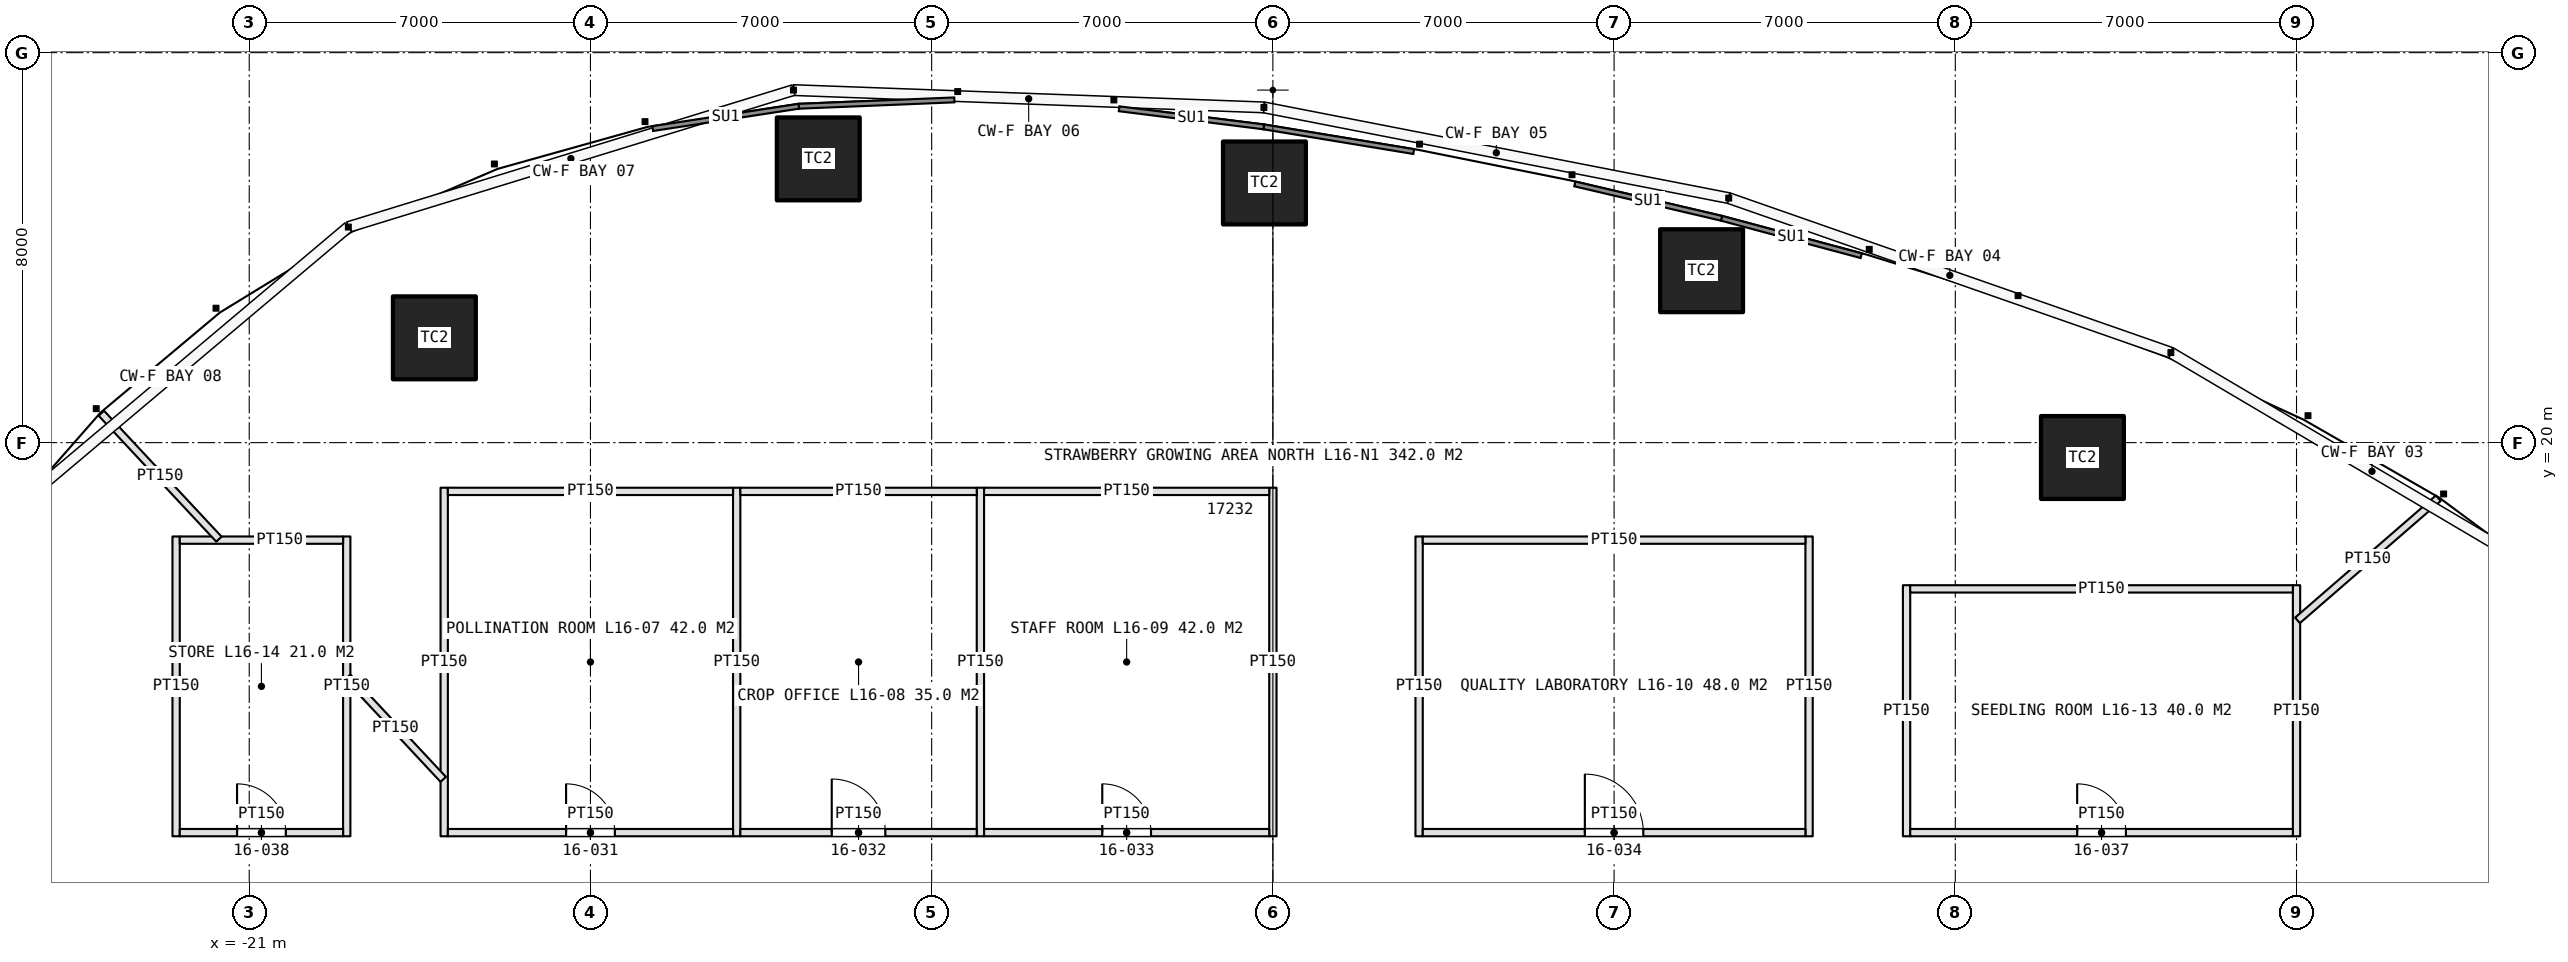
"""IFC4 building model, lengths in metres.
Left out: names, types, materials, properties, quantities, classifications, styles, units other than length and angle.
Written with IfcOpenShell. Run it as: python <this file> out.ifc"""

import sys

from ifc_helpers import new_model, si_unit, direction, frame, frame_2d, origin, origin_2d, place, context, subcontext, project, spatial, rectangle, extrude, element, fill, save


model = new_model("IFC4")
c1 = context("Model", 3, precision=1e-05, world=origin(), true_north=direction((0.0, 1.0)))
c2 = subcontext(c1, "Body", "Model", "MODEL_VIEW")
j1 = project(units=[si_unit("LENGTHUNIT", "METRE"), si_unit("PLANEANGLEUNIT", "RADIAN")], contexts=[c1])
p1 = place(None, origin())
s1 = spatial("IfcSite", under=j1, at=p1, CompositionType="ELEMENT")
p2 = place(p1, origin())
s2 = spatial("IfcBuilding", under=s1, at=p2, CompositionType="ELEMENT")
p3 = place(p2, frame((0.0, 0.0, 80.0)))
s3 = spatial("IfcBuildingStorey", under=s2, at=p3, CompositionType="ELEMENT", Elevation=80.0)
for number, where, z_axis, x_axis in (
    (1, (16.608, 19.695, 0.0), (0.0, 0.0, 1.0), (1.0, 0.0, 0.0)),
    (2, (8.795, 23.527, 0.0), (0.0, 0.0, 1.0), (1.0, 0.0, 0.0)),
    (3, (-0.173, 25.327, 0.0), (0.0, 0.0, 1.0), (1.0, 0.0, 0.0)),
    (4, (-9.326, 25.821, 0.0), (0.0, 0.0, 1.0), (1.0, 0.0, 0.0)),
    (5, (-17.202, 22.15, 0.0), (0.0, 0.0, 1.0), (1.0, 0.0, 0.0)),
):
    element("IfcColumn", number, at=place(p3, frame(where, z_axis=z_axis, x_axis=x_axis)), inside=s3, PredefinedType="COLUMN", context=c2, shape_type="SweptSolid", body=[
        extrude(rectangle(XDim=1.7, YDim=1.7, at=origin_2d()), origin(), (0.0, 0.0, 1.0), 5.0),
    ])
for number, where, z_axis, x_axis in (
    (6, (-17.0, 11.925, 0.0), (0.0, 0.0, 1.0), (0.0, 1.0, 0.0)),
    (7, (-11.0, 11.925, 0.0), (0.0, 0.0, 1.0), (0.0, 1.0, 0.0)),
    (8, (-6.0, 11.925, 0.0), (0.0, 0.0, 1.0), (0.0, 1.0, 0.0)),
    (9, (0.0, 11.925, 0.0), (0.0, 0.0, 1.0), (0.0, 1.0, 0.0)),
):
    element("IfcWall", number, at=place(p3, frame(where, z_axis=z_axis, x_axis=x_axis)), inside=s3, PredefinedType="PARTITIONING", context=c2, shape_type="SweptSolid", body=[
        extrude(rectangle(XDim=7.15, YDim=0.15, at=frame_2d((3.575, 0.0))), origin(), (0.0, 0.0, 1.0), 3.6),
    ])
p4 = place(p3, frame((-16.925, 12.0, 0.0), z_axis=(0.0, 0.0, 1.0), x_axis=(1.0, 0.0, 0.0)))
e10 = element("IfcWall", 10, at=p4, inside=s3, PredefinedType="PARTITIONING", context=c2, shape_type="SweptSolid", body=[
    extrude(rectangle(XDim=5.85, YDim=0.15, at=frame_2d((2.925, 0.0))), origin(), (0.0, 0.0, 1.0), 3.6),
])
p5 = place(p4, frame((2.425, 0.0, 0.0)))
e11 = element("IfcOpeningElement", 11, at=p5, cuts=e10, PredefinedType="OPENING", context=c2, shape_type="SweptSolid", body=[
    extrude(rectangle(XDim=1.0, YDim=2.2, at=frame_2d((0.5, 1.1))), frame((0.0, 0.085, 0.0), z_axis=(0.0, -1.0, 0.0), x_axis=(1.0, 0.0, 0.0)), (0.0, 0.0, 1.0), 0.17),
])
p6 = place(p3, frame((-16.925, 19.0, 0.0), z_axis=(0.0, 0.0, 1.0), x_axis=(1.0, 0.0, 0.0)))
e12 = element("IfcWall", 12, at=p6, inside=s3, PredefinedType="PARTITIONING", context=c2, shape_type="SweptSolid", body=[
    extrude(rectangle(XDim=5.85, YDim=0.15, at=frame_2d((2.925, 0.0))), origin(), (0.0, 0.0, 1.0), 3.6),
])
p7 = place(p3, frame((-10.925, 12.0, 0.0), z_axis=(0.0, 0.0, 1.0), x_axis=(1.0, 0.0, 0.0)))
e13 = element("IfcWall", 13, at=p7, inside=s3, PredefinedType="PARTITIONING", context=c2, shape_type="SweptSolid", body=[
    extrude(rectangle(XDim=4.85, YDim=0.15, at=frame_2d((2.425, 0.0))), origin(), (0.0, 0.0, 1.0), 3.6),
])
p8 = place(p7, frame((1.875, 0.0, 0.0)))
e14 = element("IfcOpeningElement", 14, at=p8, cuts=e13, PredefinedType="OPENING", context=c2, shape_type="SweptSolid", body=[
    extrude(rectangle(XDim=1.1, YDim=2.3, at=frame_2d((0.55, 1.15))), frame((0.0, 0.085, 0.0), z_axis=(0.0, -1.0, 0.0), x_axis=(1.0, 0.0, 0.0)), (0.0, 0.0, 1.0), 0.17),
])
p9 = place(p3, frame((-10.925, 19.0, 0.0), z_axis=(0.0, 0.0, 1.0), x_axis=(1.0, 0.0, 0.0)))
e15 = element("IfcWall", 15, at=p9, inside=s3, PredefinedType="PARTITIONING", context=c2, shape_type="SweptSolid", body=[
    extrude(rectangle(XDim=4.85, YDim=0.15, at=frame_2d((2.425, 0.0))), origin(), (0.0, 0.0, 1.0), 3.6),
])
p10 = place(p3, frame((-5.925, 12.0, 0.0), z_axis=(0.0, 0.0, 1.0), x_axis=(1.0, 0.0, 0.0)))
e16 = element("IfcWall", 16, at=p10, inside=s3, PredefinedType="PARTITIONING", context=c2, shape_type="SweptSolid", body=[
    extrude(rectangle(XDim=5.85, YDim=0.15, at=frame_2d((2.925, 0.0))), origin(), (0.0, 0.0, 1.0), 3.6),
])
p11 = place(p10, frame((2.425, 0.0, 0.0)))
e17 = element("IfcOpeningElement", 17, at=p11, cuts=e16, PredefinedType="OPENING", context=c2, shape_type="SweptSolid", body=[
    extrude(rectangle(XDim=1.0, YDim=2.2, at=frame_2d((0.5, 1.1))), frame((0.0, 0.085, 0.0), z_axis=(0.0, -1.0, 0.0), x_axis=(1.0, 0.0, 0.0)), (0.0, 0.0, 1.0), 0.17),
])
p12 = place(p3, frame((-5.925, 19.0, 0.0), z_axis=(0.0, 0.0, 1.0), x_axis=(1.0, 0.0, 0.0)))
e18 = element("IfcWall", 18, at=p12, inside=s3, PredefinedType="PARTITIONING", context=c2, shape_type="SweptSolid", body=[
    extrude(rectangle(XDim=5.85, YDim=0.15, at=frame_2d((2.925, 0.0))), origin(), (0.0, 0.0, 1.0), 3.6),
])
for number, where, z_axis, x_axis in (
    (19, (3.0, 11.925, 0.0), (0.0, 0.0, 1.0), (0.0, 1.0, 0.0)),
    (20, (11.0, 11.925, 0.0), (0.0, 0.0, 1.0), (0.0, 1.0, 0.0)),
):
    element("IfcWall", number, at=place(p3, frame(where, z_axis=z_axis, x_axis=x_axis)), inside=s3, PredefinedType="PARTITIONING", context=c2, shape_type="SweptSolid", body=[
        extrude(rectangle(XDim=6.15, YDim=0.15, at=frame_2d((3.075, 0.0))), origin(), (0.0, 0.0, 1.0), 3.6),
    ])
p13 = place(p3, frame((3.075, 12.0, 0.0), z_axis=(0.0, 0.0, 1.0), x_axis=(1.0, 0.0, 0.0)))
e21 = element("IfcWall", 21, at=p13, inside=s3, PredefinedType="PARTITIONING", context=c2, shape_type="SweptSolid", body=[
    extrude(rectangle(XDim=7.85, YDim=0.15, at=frame_2d((3.925, 0.0))), origin(), (0.0, 0.0, 1.0), 3.6),
])
p14 = place(p13, frame((3.325, 0.0, 0.0)))
e22 = element("IfcOpeningElement", 22, at=p14, cuts=e21, PredefinedType="OPENING", context=c2, shape_type="SweptSolid", body=[
    extrude(rectangle(XDim=1.2, YDim=2.3, at=frame_2d((0.6, 1.15))), frame((0.0, 0.085, 0.0), z_axis=(0.0, -1.0, 0.0), x_axis=(1.0, 0.0, 0.0)), (0.0, 0.0, 1.0), 0.17),
])
p15 = place(p3, frame((3.075, 18.0, 0.0), z_axis=(0.0, 0.0, 1.0), x_axis=(1.0, 0.0, 0.0)))
e23 = element("IfcWall", 23, at=p15, inside=s3, PredefinedType="PARTITIONING", context=c2, shape_type="SweptSolid", body=[
    extrude(rectangle(XDim=7.85, YDim=0.15, at=frame_2d((3.925, 0.0))), origin(), (0.0, 0.0, 1.0), 3.6),
])
for number, where, z_axis, x_axis in (
    (24, (13.0, 11.925, 0.0), (0.0, 0.0, 1.0), (0.0, 1.0, 0.0)),
    (25, (21.0, 11.925, 0.0), (0.0, 0.0, 1.0), (0.0, 1.0, 0.0)),
):
    element("IfcWall", number, at=place(p3, frame(where, z_axis=z_axis, x_axis=x_axis)), inside=s3, PredefinedType="PARTITIONING", context=c2, shape_type="SweptSolid", body=[
        extrude(rectangle(XDim=5.15, YDim=0.15, at=frame_2d((2.575, 0.0))), origin(), (0.0, 0.0, 1.0), 3.6),
    ])
p16 = place(p3, frame((13.075, 12.0, 0.0), z_axis=(0.0, 0.0, 1.0), x_axis=(1.0, 0.0, 0.0)))
e26 = element("IfcWall", 26, at=p16, inside=s3, PredefinedType="PARTITIONING", context=c2, shape_type="SweptSolid", body=[
    extrude(rectangle(XDim=7.85, YDim=0.15, at=frame_2d((3.925, 0.0))), origin(), (0.0, 0.0, 1.0), 3.6),
])
p17 = place(p16, frame((3.425, 0.0, 0.0)))
e27 = element("IfcOpeningElement", 27, at=p17, cuts=e26, PredefinedType="OPENING", context=c2, shape_type="SweptSolid", body=[
    extrude(rectangle(XDim=1.0, YDim=2.2, at=frame_2d((0.5, 1.1))), frame((0.0, 0.085, 0.0), z_axis=(0.0, -1.0, 0.0), x_axis=(1.0, 0.0, 0.0)), (0.0, 0.0, 1.0), 0.17),
])
p18 = place(p3, frame((13.075, 17.0, 0.0), z_axis=(0.0, 0.0, 1.0), x_axis=(1.0, 0.0, 0.0)))
e28 = element("IfcWall", 28, at=p18, inside=s3, PredefinedType="PARTITIONING", context=c2, shape_type="SweptSolid", body=[
    extrude(rectangle(XDim=7.85, YDim=0.15, at=frame_2d((3.925, 0.0))), origin(), (0.0, 0.0, 1.0), 3.6),
])
for number, where, z_axis, x_axis in (
    (29, (-22.5, 11.925, 0.0), (0.0, 0.0, 1.0), (0.0, 1.0, 0.0)),
    (30, (-19.0, 11.925, 0.0), (0.0, 0.0, 1.0), (0.0, 1.0, 0.0)),
):
    element("IfcWall", number, at=place(p3, frame(where, z_axis=z_axis, x_axis=x_axis)), inside=s3, PredefinedType="PARTITIONING", context=c2, shape_type="SweptSolid", body=[
        extrude(rectangle(XDim=6.15, YDim=0.15, at=frame_2d((3.075, 0.0))), origin(), (0.0, 0.0, 1.0), 3.6),
    ])
p19 = place(p3, frame((-22.425, 12.0, 0.0), z_axis=(0.0, 0.0, 1.0), x_axis=(1.0, 0.0, 0.0)))
e31 = element("IfcWall", 31, at=p19, inside=s3, PredefinedType="PARTITIONING", context=c2, shape_type="SweptSolid", body=[
    extrude(rectangle(XDim=3.35, YDim=0.15, at=frame_2d((1.675, 0.0))), origin(), (0.0, 0.0, 1.0), 3.6),
])
p20 = place(p19, frame((1.175, 0.0, 0.0)))
e32 = element("IfcOpeningElement", 32, at=p20, cuts=e31, PredefinedType="OPENING", context=c2, shape_type="SweptSolid", body=[
    extrude(rectangle(XDim=1.0, YDim=2.2, at=frame_2d((0.5, 1.1))), frame((0.0, 0.085, 0.0), z_axis=(0.0, -1.0, 0.0), x_axis=(1.0, 0.0, 0.0)), (0.0, 0.0, 1.0), 0.17),
])
p21 = place(p3, frame((-22.425, 18.0, 0.0), z_axis=(0.0, 0.0, 1.0), x_axis=(1.0, 0.0, 0.0)))
e33 = element("IfcWall", 33, at=p21, inside=s3, PredefinedType="PARTITIONING", context=c2, shape_type="SweptSolid", body=[
    extrude(rectangle(XDim=3.35, YDim=0.15, at=frame_2d((1.675, 0.0))), origin(), (0.0, 0.0, 1.0), 3.6),
])
p22 = place(p3, frame((-21.622, 18.02, 0.0), z_axis=(0.0, 0.0, 1.0), x_axis=(-0.682522451791, 0.730864626864, 0.0)))
e34 = element("IfcWall", 34, at=p22, inside=s3, PredefinedType="PARTITIONING", context=c2, shape_type="SweptSolid", body=[
    extrude(rectangle(XDim=3.535, YDim=0.15, at=frame_2d((1.768, 0.0))), origin(), (0.0, 0.0, 1.0), 3.6),
])
p23 = place(p3, frame((-17.02, 13.092, 0.0), z_axis=(0.0, 0.0, 1.0), x_axis=(-0.682506029746, 0.730879962347, 0.0)))
e35 = element("IfcWall", 35, at=p23, inside=s3, PredefinedType="PARTITIONING", context=c2, shape_type="SweptSolid", body=[
    extrude(rectangle(XDim=2.872, YDim=0.15, at=frame_2d((1.436, 0.0))), origin(), (0.0, 0.0, 1.0), 3.6),
])
p24 = place(p3, frame((21.02, 16.354, 0.0), z_axis=(0.0, 0.0, 1.0), x_axis=(0.755425653008, 0.655234372402, 0.0)))
e36 = element("IfcWall", 36, at=p24, inside=s3, PredefinedType="PARTITIONING", context=c2, shape_type="SweptSolid", body=[
    extrude(rectangle(XDim=3.823, YDim=0.15, at=frame_2d((1.912, 0.0))), origin(), (0.0, 0.0, 1.0), 3.6),
])
p25 = place(p5, origin())
e37 = element("IfcDoor", 37, at=p25, inside=s3, OperationType="SINGLE_SWING_LEFT", PredefinedType="DOOR", context=c2, shape_type="SweptSolid", body=[
    extrude(rectangle(XDim=1.0, YDim=2.2, at=frame_2d((0.5, 1.1))), frame((0.0, 0.025, 0.0), z_axis=(0.0, -1.0, 0.0), x_axis=(1.0, 0.0, 0.0)), (0.0, 0.0, 1.0), 0.05),
])
fill(e11, e37)
p26 = place(p8, origin())
e38 = element("IfcDoor", 38, at=p26, inside=s3, OperationType="SINGLE_SWING_LEFT", PredefinedType="DOOR", context=c2, shape_type="SweptSolid", body=[
    extrude(rectangle(XDim=1.1, YDim=2.3, at=frame_2d((0.55, 1.15))), frame((0.0, 0.025, 0.0), z_axis=(0.0, -1.0, 0.0), x_axis=(1.0, 0.0, 0.0)), (0.0, 0.0, 1.0), 0.05),
])
fill(e14, e38)
p27 = place(p11, origin())
e39 = element("IfcDoor", 39, at=p27, inside=s3, OperationType="SINGLE_SWING_LEFT", PredefinedType="DOOR", context=c2, shape_type="SweptSolid", body=[
    extrude(rectangle(XDim=1.0, YDim=2.2, at=frame_2d((0.5, 1.1))), frame((0.0, 0.025, 0.0), z_axis=(0.0, -1.0, 0.0), x_axis=(1.0, 0.0, 0.0)), (0.0, 0.0, 1.0), 0.05),
])
fill(e17, e39)
p28 = place(p14, origin())
e40 = element("IfcDoor", 40, at=p28, inside=s3, OperationType="SINGLE_SWING_LEFT", PredefinedType="DOOR", context=c2, shape_type="SweptSolid", body=[
    extrude(rectangle(XDim=1.2, YDim=2.3, at=frame_2d((0.6, 1.15))), frame((0.0, 0.025, 0.0), z_axis=(0.0, -1.0, 0.0), x_axis=(1.0, 0.0, 0.0)), (0.0, 0.0, 1.0), 0.05),
])
fill(e22, e40)
p29 = place(p17, origin())
e41 = element("IfcDoor", 41, at=p29, inside=s3, OperationType="SINGLE_SWING_LEFT", PredefinedType="DOOR", context=c2, shape_type="SweptSolid", body=[
    extrude(rectangle(XDim=1.0, YDim=2.2, at=frame_2d((0.5, 1.1))), frame((0.0, 0.025, 0.0), z_axis=(0.0, -1.0, 0.0), x_axis=(1.0, 0.0, 0.0)), (0.0, 0.0, 1.0), 0.05),
])
fill(e27, e41)
p30 = place(p20, origin())
e42 = element("IfcDoor", 42, at=p30, inside=s3, OperationType="SINGLE_SWING_LEFT", PredefinedType="DOOR", context=c2, shape_type="SweptSolid", body=[
    extrude(rectangle(XDim=1.0, YDim=2.2, at=frame_2d((0.5, 1.1))), frame((0.0, 0.025, 0.0), z_axis=(0.0, -1.0, 0.0), x_axis=(1.0, 0.0, 0.0)), (0.0, 0.0, 1.0), 0.05),
])
fill(e32, e42)
save(model, sys.argv[1])
